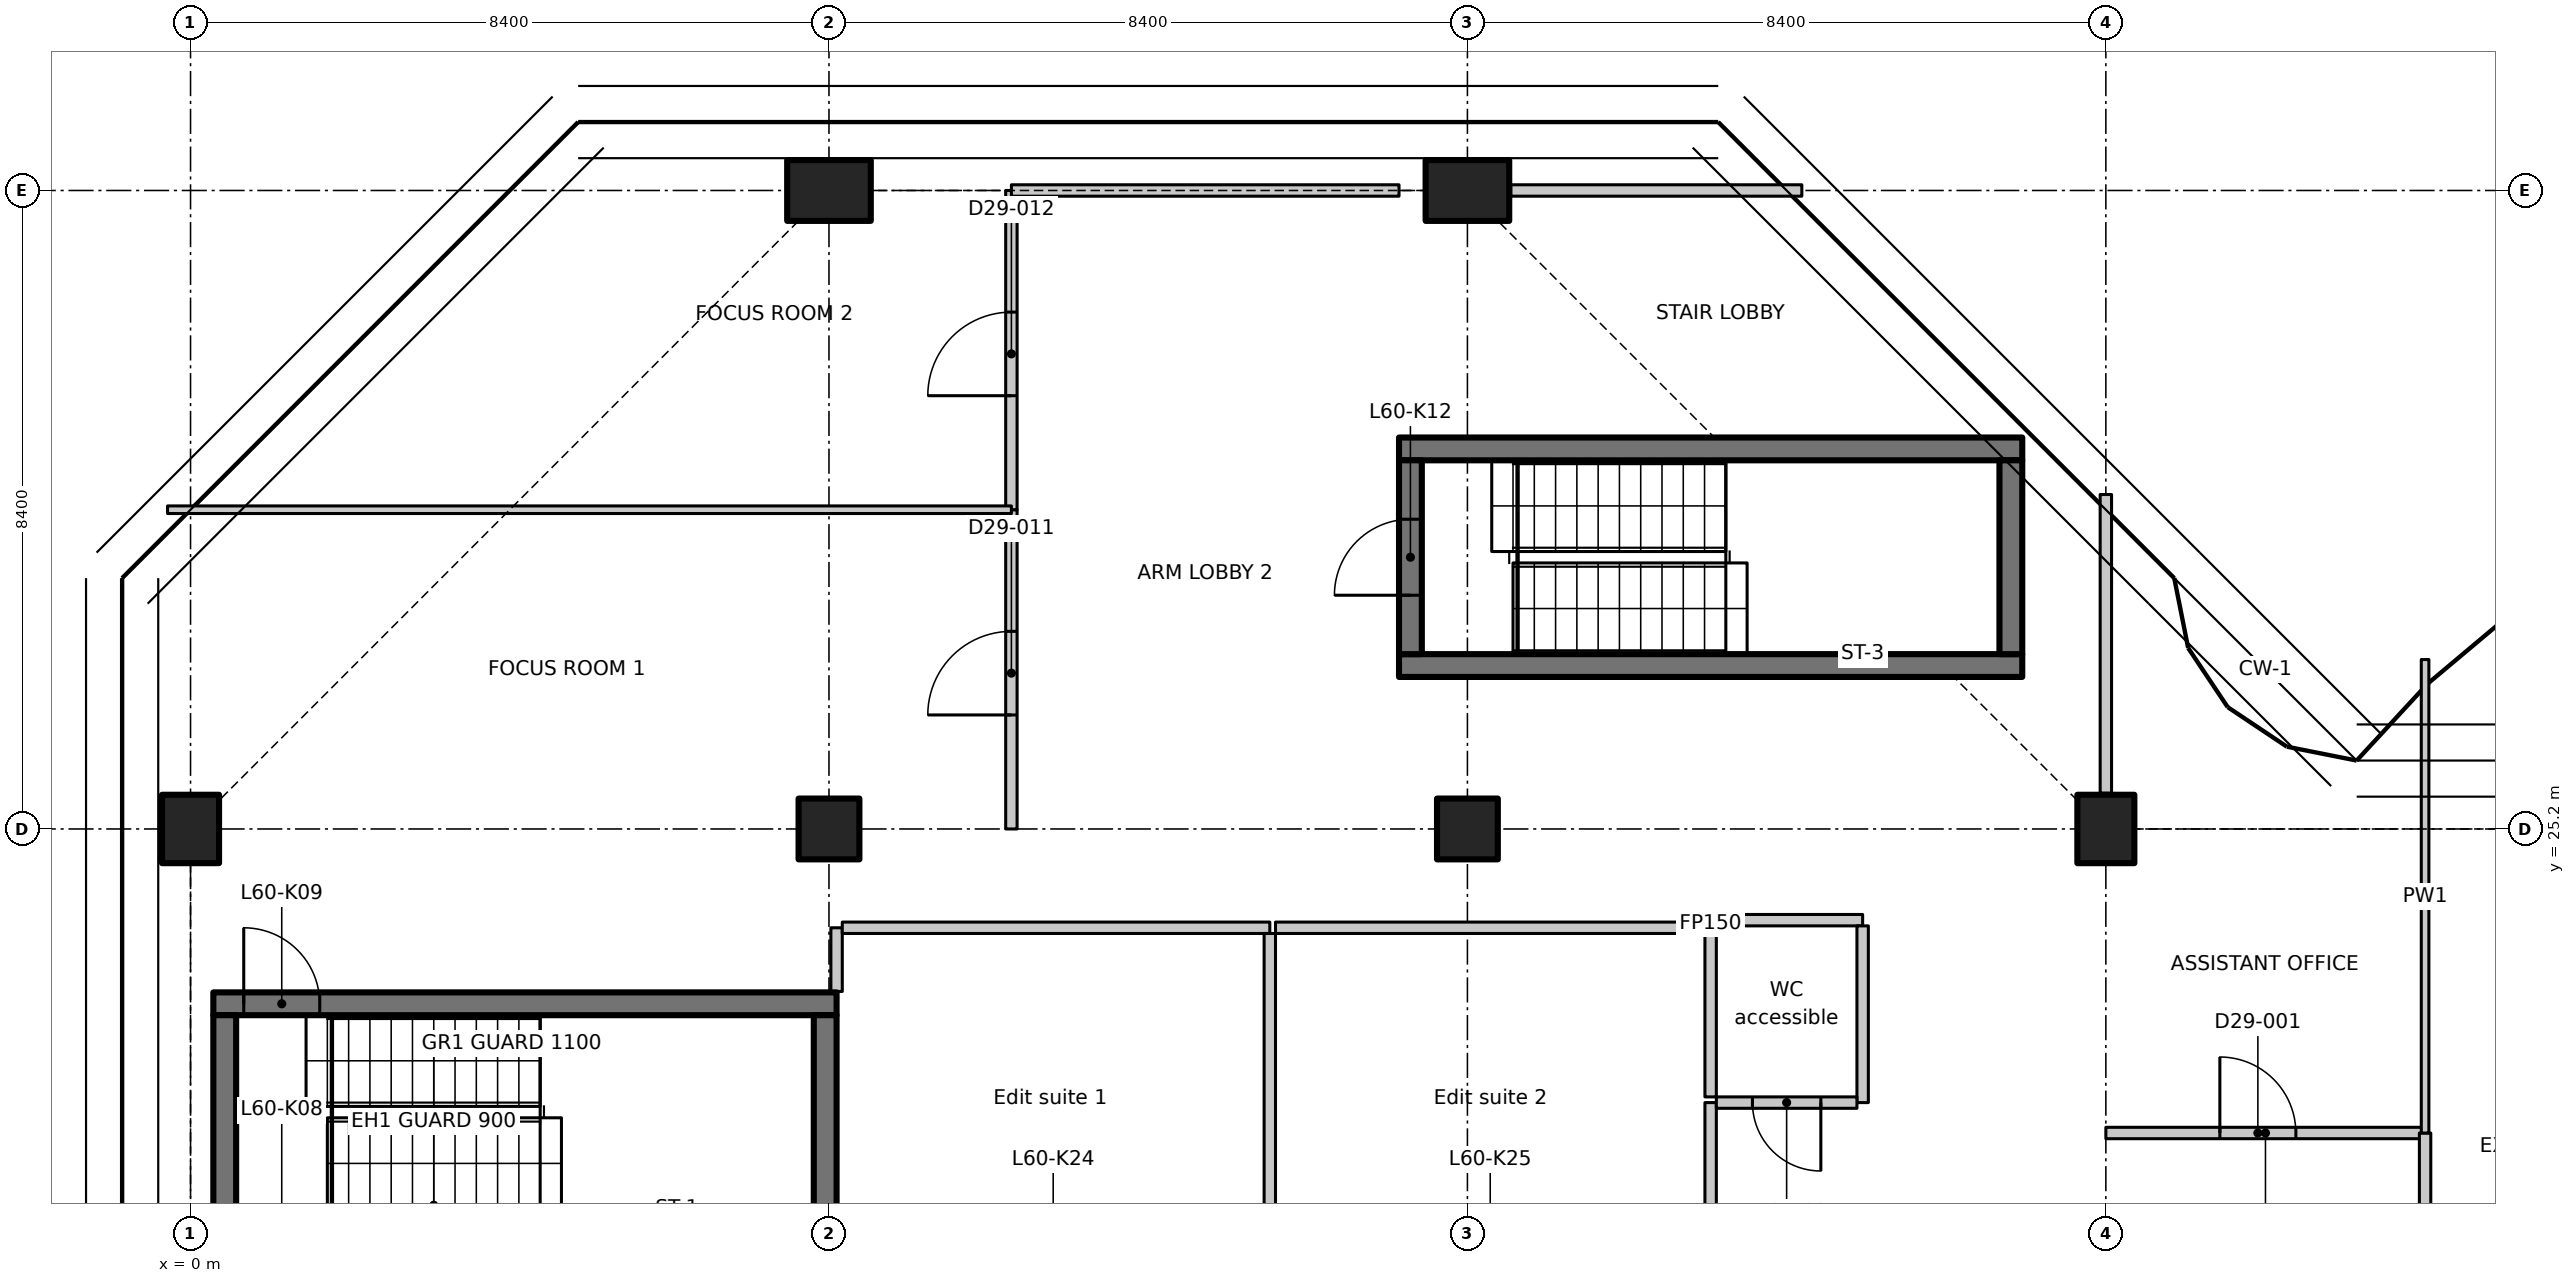
"""IFC4 building model, lengths in metres.
Left out: names, types, materials, properties, quantities, classifications, styles, units other than length and angle.
Written with IfcOpenShell. Run it as: python <this file> out.ifc"""

import sys

from ifc_helpers import new_model, si_unit, direction, frame, frame_2d, origin, origin_2d, place, context, subcontext, project, spatial, polyline, rectangle, outline, extrude, element, fill, save


model = new_model("IFC4")
c1 = context("Model", 3, precision=1e-05, world=origin(), true_north=direction((0.0, 1.0)))
c2 = subcontext(c1, "Body", "Model", "MODEL_VIEW")
j1 = project(units=[si_unit("LENGTHUNIT", "METRE"), si_unit("PLANEANGLEUNIT", "RADIAN")], contexts=[c1])
p1 = place(None, origin())
s1 = spatial("IfcSite", under=j1, at=p1, CompositionType="ELEMENT")
p2 = place(p1, origin())
s2 = spatial("IfcBuilding", under=s1, at=p2, CompositionType="ELEMENT")
p3 = place(p2, frame((0.0, 0.0, 237.3)))
s3 = spatial("IfcBuildingStorey", under=s2, at=p3, CompositionType="ELEMENT", Elevation=237.3)
p4 = place(p3, frame((0.0, 25.2, 0.0), z_axis=(0.0, 0.0, 1.0), x_axis=(1.0, 0.0, 0.0)))
e1 = element("IfcColumn", 1, at=p4, inside=s3, PredefinedType="COLUMN", context=c2, shape_type="SweptSolid", body=[
    extrude(rectangle(XDim=0.75, YDim=0.9, at=origin_2d()), origin(), (0.0, 0.0, 1.0), 3.35),
])
p5 = place(p3, frame((8.4, 25.2, 0.0), z_axis=(0.0, 0.0, 1.0), x_axis=(1.0, 0.0, 0.0)))
e2 = element("IfcColumn", 2, at=p5, inside=s3, PredefinedType="COLUMN", context=c2, shape_type="SweptSolid", body=[
    extrude(rectangle(XDim=0.8, YDim=0.8, at=origin_2d()), origin(), (0.0, 0.0, 1.0), 3.35),
])
p6 = place(p3, frame((8.4, 33.6, 0.0), z_axis=(0.0, 0.0, 1.0), x_axis=(0.0, 1.0, 0.0)))
e3 = element("IfcColumn", 3, at=p6, inside=s3, PredefinedType="COLUMN", context=c2, shape_type="SweptSolid", body=[
    extrude(rectangle(XDim=0.8, YDim=1.1, at=origin_2d()), origin(), (0.0, 0.0, 1.0), 3.35),
])
p7 = place(p3, frame((16.8, 25.2, 0.0), z_axis=(0.0, 0.0, 1.0), x_axis=(1.0, 0.0, 0.0)))
e4 = element("IfcColumn", 4, at=p7, inside=s3, PredefinedType="COLUMN", context=c2, shape_type="SweptSolid", body=[
    extrude(rectangle(XDim=0.8, YDim=0.8, at=origin_2d()), origin(), (0.0, 0.0, 1.0), 3.35),
])
p8 = place(p3, frame((16.8, 33.6, 0.0), z_axis=(0.0, 0.0, 1.0), x_axis=(0.0, 1.0, 0.0)))
e5 = element("IfcColumn", 5, at=p8, inside=s3, PredefinedType="COLUMN", context=c2, shape_type="SweptSolid", body=[
    extrude(rectangle(XDim=0.8, YDim=1.1, at=origin_2d()), origin(), (0.0, 0.0, 1.0), 3.35),
])
p9 = place(p3, frame((25.2, 25.2, 0.0), z_axis=(0.0, 0.0, 1.0), x_axis=(1.0, 0.0, 0.0)))
e6 = element("IfcColumn", 6, at=p9, inside=s3, PredefinedType="COLUMN", context=c2, shape_type="SweptSolid", body=[
    extrude(rectangle(XDim=0.75, YDim=0.9, at=origin_2d()), origin(), (0.0, 0.0, 1.0), 3.35),
])
p10 = place(p3, frame((0.3, 22.9, 0.0), z_axis=(0.0, 0.0, 1.0), x_axis=(1.0, 0.0, 0.0)))
e7 = element("IfcWall", 7, at=p10, inside=s3, PredefinedType="SHEAR", context=c2, shape_type="SweptSolid", body=[
    extrude(rectangle(XDim=8.2, YDim=0.3, at=frame_2d((4.1, 0.0))), origin(), (0.0, 0.0, 1.0), 3.35),
])
p11 = place(p10, frame((0.4, 0.0, 0.0)))
e8 = element("IfcOpeningElement", 8, at=p11, cuts=e7, PredefinedType="OPENING", context=c2, shape_type="SweptSolid", body=[
    extrude(rectangle(XDim=1.0, YDim=2.1, at=frame_2d((0.5, 1.05))), frame((0.0, 0.16, 0.0), z_axis=(0.0, -1.0, 0.0), x_axis=(1.0, 0.0, 0.0)), (0.0, 0.0, 1.0), 0.32),
])
for number, where, z_axis, x_axis in (
    (9, (0.45, 20.2, 0.0), (0.0, 0.0, 1.0), (0.0, 1.0, 0.0)),
    (10, (8.35, 20.2, 0.0), (0.0, 0.0, 1.0), (0.0, 1.0, 0.0)),
):
    element("IfcWall", number, at=place(p3, frame(where, z_axis=z_axis, x_axis=x_axis)), inside=s3, PredefinedType="SHEAR", context=c2, shape_type="SweptSolid", body=[
        extrude(rectangle(XDim=2.55, YDim=0.3, at=frame_2d((1.275, 0.0))), origin(), (0.0, 0.0, 1.0), 3.35),
    ])
for number, where, z_axis, x_axis in (
    (11, (15.9, 27.35, 0.0), (0.0, 0.0, 1.0), (1.0, 0.0, 0.0)),
    (12, (15.9, 30.2, 0.0), (0.0, 0.0, 1.0), (1.0, 0.0, 0.0)),
):
    element("IfcWall", number, at=place(p3, frame(where, z_axis=z_axis, x_axis=x_axis)), inside=s3, PredefinedType="SHEAR", context=c2, shape_type="SweptSolid", body=[
        extrude(rectangle(XDim=8.2, YDim=0.3, at=frame_2d((4.1, 0.0))), origin(), (0.0, 0.0, 1.0), 3.35),
    ])
p12 = place(p3, frame((16.05, 27.5, 0.0), z_axis=(0.0, 0.0, 1.0), x_axis=(0.0, 1.0, 0.0)))
e13 = element("IfcWall", 13, at=p12, inside=s3, PredefinedType="SHEAR", context=c2, shape_type="SweptSolid", body=[
    extrude(rectangle(XDim=2.55, YDim=0.3, at=frame_2d((1.275, 0.0))), origin(), (0.0, 0.0, 1.0), 3.35),
])
p13 = place(p12, frame((0.775, 0.0, 0.0)))
e14 = element("IfcOpeningElement", 14, at=p13, cuts=e13, PredefinedType="OPENING", context=c2, shape_type="SweptSolid", body=[
    extrude(rectangle(XDim=1.0, YDim=2.1, at=frame_2d((0.5, 1.05))), frame((0.0, 0.16, 0.0), z_axis=(0.0, -1.0, 0.0), x_axis=(1.0, 0.0, 0.0)), (0.0, 0.0, 1.0), 0.32),
])
p14 = place(p3, frame((23.95, 27.5, 0.0), z_axis=(0.0, 0.0, 1.0), x_axis=(0.0, 1.0, 0.0)))
e15 = element("IfcWall", 15, at=p14, inside=s3, PredefinedType="SHEAR", context=c2, shape_type="SweptSolid", body=[
    extrude(rectangle(XDim=2.55, YDim=0.3, at=frame_2d((1.275, 0.0))), origin(), (0.0, 0.0, 1.0), 3.35),
])
p15 = place(p3, frame((8.5, 23.062, 0.0), z_axis=(0.0, 0.0, 1.0), x_axis=(0.0, 1.0, 0.0)))
e16 = element("IfcWall", 16, at=p15, inside=s3, PredefinedType="PARTITIONING", context=c2, shape_type="SweptSolid", body=[
    extrude(rectangle(XDim=0.838, YDim=0.15, at=frame_2d((0.419, 0.0))), origin(), (0.0, 0.0, 1.0), 3.35),
])
p16 = place(p3, frame((8.575, 23.9, 0.0), z_axis=(0.0, 0.0, 1.0), x_axis=(1.0, 0.0, 0.0)))
e17 = element("IfcWall", 17, at=p16, inside=s3, PredefinedType="PARTITIONING", context=c2, shape_type="SweptSolid", body=[
    extrude(rectangle(XDim=5.625, YDim=0.15, at=frame_2d((2.812, 0.0))), origin(), (0.0, 0.0, 1.0), 3.35),
])
p17 = place(p3, frame((20.0, 21.6, 0.0), z_axis=(0.0, 0.0, 1.0), x_axis=(0.0, -1.0, 0.0)))
e18 = element("IfcWall", 18, at=p17, inside=s3, PredefinedType="PARTITIONING", context=c2, shape_type="SweptSolid", body=[
    extrude(rectangle(XDim=2.2, YDim=0.15, at=frame_2d((1.1, 0.0))), origin(), (0.0, 0.0, 1.0), 3.35),
])
p18 = place(p3, frame((14.2, 23.825, 0.0), z_axis=(0.0, 0.0, 1.0), x_axis=(0.0, -1.0, 0.0)))
e19 = element("IfcWall", 19, at=p18, inside=s3, PredefinedType="PARTITIONING", context=c2, shape_type="SweptSolid", body=[
    extrude(rectangle(XDim=4.35, YDim=0.15, at=frame_2d((2.175, 0.0))), origin(), (0.0, 0.0, 1.0), 3.35),
])
p19 = place(p3, frame((14.275, 23.9, 0.0), z_axis=(0.0, 0.0, 1.0), x_axis=(1.0, 0.0, 0.0)))
e20 = element("IfcWall", 20, at=p19, inside=s3, PredefinedType="PARTITIONING", context=c2, shape_type="SweptSolid", body=[
    extrude(rectangle(XDim=5.725, YDim=0.15, at=frame_2d((2.863, 0.0))), origin(), (0.0, 0.0, 1.0), 3.35),
])
p20 = place(p3, frame((20.0, 23.9, 0.0), z_axis=(0.0, 0.0, 1.0), x_axis=(0.0, 1.0, 0.0)))
e21 = element("IfcWall", 21, at=p20, inside=s3, PredefinedType="PARTITIONING", context=c2, shape_type="SweptSolid", body=[
    extrude(rectangle(XDim=0.1, YDim=0.15, at=frame_2d((0.05, 0.0))), origin(), (0.0, 0.0, 1.0), 3.35),
])
p21 = place(p3, frame((20.075, 24.0, 0.0), z_axis=(0.0, 0.0, 1.0), x_axis=(1.0, 0.0, 0.0)))
e22 = element("IfcWall", 22, at=p21, inside=s3, PredefinedType="PARTITIONING", context=c2, shape_type="SweptSolid", body=[
    extrude(rectangle(XDim=1.925, YDim=0.15, at=frame_2d((0.962, 0.0))), origin(), (0.0, 0.0, 1.0), 3.35),
])
p22 = place(p3, frame((22.0, 23.925, 0.0), z_axis=(0.0, 0.0, 1.0), x_axis=(0.0, -1.0, 0.0)))
e23 = element("IfcWall", 23, at=p22, inside=s3, PredefinedType="PARTITIONING", context=c2, shape_type="SweptSolid", body=[
    extrude(rectangle(XDim=2.325, YDim=0.15, at=frame_2d((1.163, 0.0))), origin(), (0.0, 0.0, 1.0), 3.35),
])
p23 = place(p3, frame((21.925, 21.6, 0.0), z_axis=(0.0, 0.0, 1.0), x_axis=(-1.0, 0.0, 0.0)))
e24 = element("IfcWall", 24, at=p23, inside=s3, PredefinedType="PARTITIONING", context=c2, shape_type="SweptSolid", body=[
    extrude(rectangle(XDim=1.85, YDim=0.15, at=frame_2d((0.925, 0.0))), origin(), (0.0, 0.0, 1.0), 3.35),
])
p24 = place(p23, frame((0.475, 0.0, 0.0)))
e25 = element("IfcOpeningElement", 25, at=p24, cuts=e24, PredefinedType="OPENING", context=c2, shape_type="SweptSolid", body=[
    extrude(rectangle(XDim=0.9, YDim=2.1, at=frame_2d((0.45, 1.05))), frame((0.0, 0.085, 0.0), z_axis=(0.0, -1.0, 0.0), x_axis=(1.0, 0.0, 0.0)), (0.0, 0.0, 1.0), 0.17),
])
p25 = place(p3, frame((20.0, 21.675, 0.0), z_axis=(0.0, 0.0, 1.0), x_axis=(0.0, 1.0, 0.0)))
e26 = element("IfcWall", 26, at=p25, inside=s3, PredefinedType="PARTITIONING", context=c2, shape_type="SweptSolid", body=[
    extrude(rectangle(XDim=2.15, YDim=0.15, at=frame_2d((1.075, 0.0))), origin(), (0.0, 0.0, 1.0), 3.35),
])
p26 = place(p3, frame((25.2, 21.2, 0.0), z_axis=(0.0, 0.0, 1.0), x_axis=(1.0, 0.0, 0.0)))
e27 = element("IfcWall", 27, at=p26, inside=s3, PredefinedType="PARTITIONING", context=c2, shape_type="SweptSolid", body=[
    extrude(rectangle(XDim=4.2, YDim=0.15, at=frame_2d((2.1, 0.0))), origin(), (0.0, 0.0, 1.0), 3.33),
])
p27 = place(p26, frame((1.5, 0.0, 0.0)))
e28 = element("IfcOpeningElement", 28, at=p27, cuts=e27, PredefinedType="OPENING", context=c2, shape_type="SweptSolid", body=[
    extrude(rectangle(XDim=1.0, YDim=2.1, at=frame_2d((0.5, 1.05))), frame((0.0, 0.085, 0.0), z_axis=(0.0, -1.0, 0.0), x_axis=(1.0, 0.0, 0.0)), (0.0, 0.0, 1.0), 0.17),
])
p28 = place(p3, frame((29.4, 21.2, 0.0), z_axis=(0.0, 0.0, 1.0), x_axis=(0.0, -1.0, 0.0)))
e29 = element("IfcWall", 29, at=p28, inside=s3, PredefinedType="PARTITIONING", context=c2, shape_type="SweptSolid", body=[
    extrude(rectangle(XDim=8.2, YDim=0.15, at=frame_2d((4.1, 0.0))), origin(), (0.0, 0.0, 1.0), 3.33),
])
p29 = place(p28, frame((3.3, 0.0, 0.0)))
e30 = element("IfcOpeningElement", 30, at=p29, cuts=e29, PredefinedType="OPENING", context=c2, shape_type="SweptSolid", body=[
    extrude(rectangle(XDim=1.6, YDim=2.1, at=frame_2d((0.8, 1.05))), frame((0.0, 0.085, 0.0), z_axis=(0.0, -1.0, 0.0), x_axis=(1.0, 0.0, 0.0)), (0.0, 0.0, 1.0), 0.17),
])
p30 = place(p3, frame((29.4, 27.429, 0.0), z_axis=(0.0, 0.0, 1.0), x_axis=(0.0, -1.0, 0.0)))
e31 = element("IfcWall", 31, at=p30, inside=s3, PredefinedType="PARTITIONING", context=c2, shape_type="SweptSolid", body=[
    extrude(outline(polyline([(0.0, 0.0), (6.229, 0.0), (6.229, 3.33), (2.679, 3.33), (2.677, 2.98), (1.781, 2.98), (1.779, 3.33), (0.154, 3.33), (0.0, 3.33), (0.0, 0.0)])), frame((0.0, 0.05, 0.0), z_axis=(0.0, -1.0, 0.0), x_axis=(1.0, 0.0, 0.0)), (0.0, 0.0, 1.0), 0.1),
])
p31 = place(p3, frame((25.2, 25.67, 0.0), z_axis=(0.0, 0.0, 1.0), x_axis=(0.0, 1.0, 0.0)))
e32 = element("IfcWall", 32, at=p31, inside=s3, PredefinedType="PARTITIONING", context=c2, shape_type="SweptSolid", body=[
    extrude(rectangle(XDim=3.93, YDim=0.15, at=frame_2d((1.965, 0.0))), origin(), (0.0, 0.0, 1.0), 2.98),
])
p32 = place(p3, frame((10.8, 25.2, 0.0), z_axis=(0.0, 0.0, 1.0), x_axis=(0.0, 1.0, 0.0)))
e33 = element("IfcWall", 33, at=p32, inside=s3, PredefinedType="PARTITIONING", context=c2, shape_type="SweptSolid", body=[
    extrude(rectangle(XDim=4.2, YDim=0.15, at=frame_2d((2.1, 0.0))), origin(), (0.0, 0.0, 1.0), 3.33),
])
p33 = place(p32, frame((1.5, 0.0, 0.0)))
e34 = element("IfcOpeningElement", 34, at=p33, cuts=e33, PredefinedType="OPENING", context=c2, shape_type="SweptSolid", body=[
    extrude(rectangle(XDim=1.1, YDim=2.1, at=frame_2d((0.55, 1.05))), frame((0.0, 0.085, 0.0), z_axis=(0.0, -1.0, 0.0), x_axis=(1.0, 0.0, 0.0)), (0.0, 0.0, 1.0), 0.17),
])
p34 = place(p3, frame((10.8, 29.4, 0.0), z_axis=(0.0, 0.0, 1.0), x_axis=(0.0, 1.0, 0.0)))
e35 = element("IfcWall", 35, at=p34, inside=s3, PredefinedType="PARTITIONING", context=c2, shape_type="SweptSolid", body=[
    extrude(rectangle(XDim=4.2, YDim=0.15, at=frame_2d((2.1, 0.0))), origin(), (0.0, 0.0, 1.0), 2.98),
])
p35 = place(p34, frame((1.5, 0.0, 0.0)))
e36 = element("IfcOpeningElement", 36, at=p35, cuts=e35, PredefinedType="OPENING", context=c2, shape_type="SweptSolid", body=[
    extrude(rectangle(XDim=1.1, YDim=2.1, at=frame_2d((0.55, 1.05))), frame((0.0, 0.085, 0.0), z_axis=(0.0, -1.0, 0.0), x_axis=(1.0, 0.0, 0.0)), (0.0, 0.0, 1.0), 0.17),
])
p36 = place(p3, frame((10.8, 33.6, 0.0), z_axis=(0.0, 0.0, 1.0), x_axis=(1.0, 0.0, 0.0)))
e37 = element("IfcWall", 37, at=p36, inside=s3, PredefinedType="PARTITIONING", context=c2, shape_type="SweptSolid", body=[
    extrude(outline(polyline([(0.0, 0.0), (5.1, 0.0), (5.1, 2.98), (0.0, 2.98), (0.0, 0.0)])), frame((0.0, 0.075, 0.0), z_axis=(0.0, -1.0, 0.0), x_axis=(1.0, 0.0, 0.0)), (0.0, 0.0, 1.0), 0.15),
])
p37 = place(p3, frame((17.37, 33.6, 0.0), z_axis=(0.0, 0.0, 1.0), x_axis=(1.0, 0.0, 0.0)))
e38 = element("IfcWall", 38, at=p37, inside=s3, PredefinedType="PARTITIONING", context=c2, shape_type="SweptSolid", body=[
    extrude(rectangle(XDim=3.83, YDim=0.15, at=frame_2d((1.915, 0.0))), origin(), (0.0, 0.0, 1.0), 2.98),
])
p38 = place(p3, frame((-0.302, 29.4, 0.0), z_axis=(0.0, 0.0, 1.0), x_axis=(1.0, 0.0, 0.0)))
e39 = element("IfcWall", 39, at=p38, inside=s3, PredefinedType="PARTITIONING", context=c2, shape_type="SweptSolid", body=[
    extrude(outline(polyline([(0.0, 0.0), (11.103, 0.0), (11.103, 3.33), (5.168, 3.33), (5.166, 2.98), (3.839, 2.98), (3.837, 3.33), (0.103, 3.33), (0.0, 3.33), (0.0, 0.0)])), frame((0.0, 0.05, 0.0), z_axis=(0.0, -1.0, 0.0), x_axis=(1.0, 0.0, 0.0)), (0.0, 0.0, 1.0), 0.1),
])
p39 = place(p11, origin())
e40 = element("IfcDoor", 40, at=p39, inside=s3, OperationType="SINGLE_SWING_RIGHT", PredefinedType="DOOR", context=c2, shape_type="SweptSolid", body=[
    extrude(rectangle(XDim=1.0, YDim=2.1, at=frame_2d((0.5, 1.05))), frame((0.0, 0.025, 0.0), z_axis=(0.0, -1.0, 0.0), x_axis=(1.0, 0.0, 0.0)), (0.0, 0.0, 1.0), 0.05),
])
fill(e8, e40)
p40 = place(p13, origin())
e41 = element("IfcDoor", 41, at=p40, inside=s3, OperationType="SINGLE_SWING_LEFT", PredefinedType="DOOR", context=c2, shape_type="SweptSolid", body=[
    extrude(rectangle(XDim=1.0, YDim=2.1, at=frame_2d((0.5, 1.05))), frame((0.0, 0.025, 0.0), z_axis=(0.0, -1.0, 0.0), x_axis=(1.0, 0.0, 0.0)), (0.0, 0.0, 1.0), 0.05),
])
fill(e14, e41)
p41 = place(p24, origin())
e42 = element("IfcDoor", 42, at=p41, inside=s3, OperationType="SINGLE_SWING_RIGHT", PredefinedType="DOOR", context=c2, shape_type="SweptSolid", body=[
    extrude(rectangle(XDim=0.9, YDim=2.1, at=frame_2d((0.45, 1.05))), frame((0.0, 0.025, 0.0), z_axis=(0.0, -1.0, 0.0), x_axis=(1.0, 0.0, 0.0)), (0.0, 0.0, 1.0), 0.05),
])
fill(e25, e42)
p42 = place(p27, origin())
e43 = element("IfcDoor", 43, at=p42, inside=s3, OperationType="SINGLE_SWING_LEFT", PredefinedType="DOOR", context=c2, shape_type="SweptSolid", body=[
    extrude(rectangle(XDim=1.0, YDim=2.1, at=frame_2d((0.5, 1.05))), frame((0.0, 0.025, 0.0), z_axis=(0.0, -1.0, 0.0), x_axis=(1.0, 0.0, 0.0)), (0.0, 0.0, 1.0), 0.05),
])
fill(e28, e43)
p43 = place(p33, origin())
e44 = element("IfcDoor", 44, at=p43, inside=s3, OperationType="SINGLE_SWING_LEFT", PredefinedType="DOOR", context=c2, shape_type="SweptSolid", body=[
    extrude(rectangle(XDim=1.1, YDim=2.1, at=frame_2d((0.55, 1.05))), frame((0.0, 0.025, 0.0), z_axis=(0.0, -1.0, 0.0), x_axis=(1.0, 0.0, 0.0)), (0.0, 0.0, 1.0), 0.05),
])
fill(e34, e44)
p44 = place(p35, origin())
e45 = element("IfcDoor", 45, at=p44, inside=s3, OperationType="SINGLE_SWING_LEFT", PredefinedType="DOOR", context=c2, shape_type="SweptSolid", body=[
    extrude(rectangle(XDim=1.1, YDim=2.1, at=frame_2d((0.55, 1.05))), frame((0.0, 0.025, 0.0), z_axis=(0.0, -1.0, 0.0), x_axis=(1.0, 0.0, 0.0)), (0.0, 0.0, 1.0), 0.05),
])
fill(e36, e45)
save(model, sys.argv[1])
